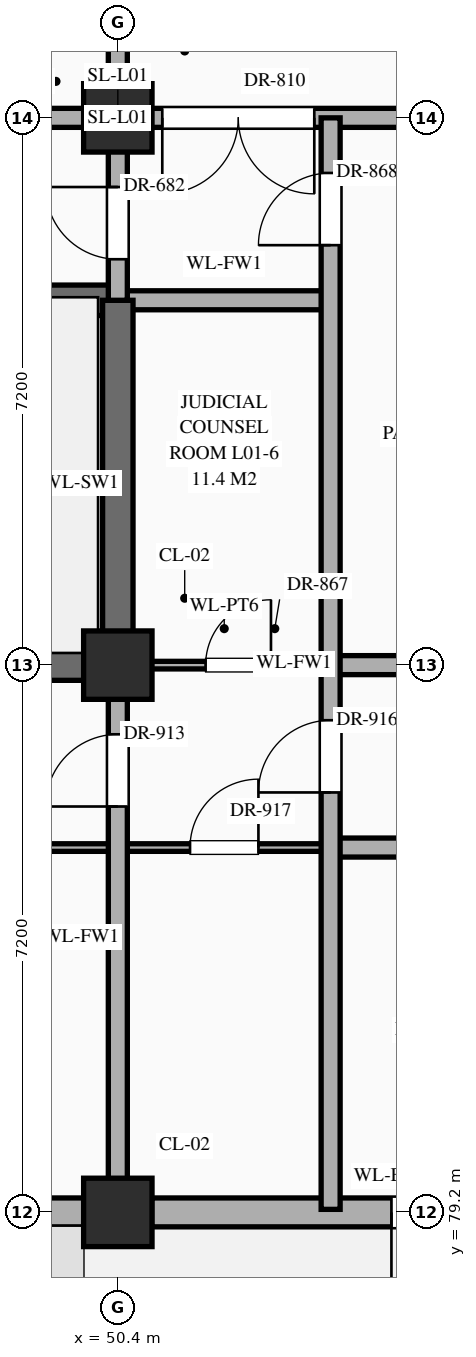
"""IFC4 building model, lengths in metres.
Left out: names, types, materials, properties, quantities, classifications, styles, units other than length and angle.
Written with IfcOpenShell. Run it as: python <this file> out.ifc"""

import sys

from ifc_helpers import new_model, si_unit, direction, frame, frame_2d, origin, origin_2d, place, context, subcontext, project, spatial, rectangle, extrude, element, fill, save


model = new_model("IFC4")
c1 = context("Model", 3, precision=1e-05, world=origin(), true_north=direction((0.0, 1.0)))
c2 = subcontext(c1, "Body", "Model", "MODEL_VIEW")
j1 = project(units=[si_unit("LENGTHUNIT", "METRE"), si_unit("PLANEANGLEUNIT", "RADIAN")], contexts=[c1])
p1 = place(None, origin())
s1 = spatial("IfcSite", under=j1, at=p1, CompositionType="ELEMENT")
p2 = place(p1, origin())
s2 = spatial("IfcBuilding", under=s1, at=p2, CompositionType="ELEMENT")
p3 = place(p2, origin())
s3 = spatial("IfcBuildingStorey", under=s2, at=p3, CompositionType="ELEMENT", Elevation=0.0)
for number, where, z_axis, x_axis in (
    (1, (50.4, 79.2, 0.0), (0.0, 0.0, 1.0), (1.0, 0.0, 0.0)),
    (2, (50.4, 86.4, 0.0), (0.0, 0.0, 1.0), (1.0, 0.0, 0.0)),
    (3, (50.4, 93.6, 0.0), (0.0, 0.0, 1.0), (1.0, 0.0, 0.0)),
):
    element("IfcColumn", number, at=place(p3, frame(where, z_axis=z_axis, x_axis=x_axis)), inside=s3, PredefinedType="COLUMN", context=c2, shape_type="SweptSolid", body=[
        extrude(rectangle(XDim=0.9, YDim=0.9, at=origin_2d()), origin(), (0.0, 0.0, 1.0), 5.4),
    ])
p4 = place(p3, frame((42.42, 79.2, 0.0), z_axis=(0.0, 0.0, 1.0), x_axis=(1.0, 0.0, 0.0)))
e4 = element("IfcWall", 4, at=p4, inside=s3, PredefinedType="STANDARD", context=c2, shape_type="SweptSolid", body=[
    extrude(rectangle(XDim=7.535, YDim=0.38, at=frame_2d((3.768, 0.0))), origin(), (0.0, 0.0, 1.0), 4.47),
])
p5 = place(p4, frame((2.567, 0.0, 0.0)))
e5 = element("IfcOpeningElement", 5, at=p5, cuts=e4, PredefinedType="OPENING", context=c2, shape_type="SweptSolid", body=[
    extrude(rectangle(XDim=2.4, YDim=2.4, at=frame_2d((1.2, 1.2))), frame((0.0, 0.202, 0.0), z_axis=(0.0, -1.0, 0.0), x_axis=(1.0, 0.0, 0.0)), (0.0, 0.0, 1.0), 0.404),
])
p6 = place(p3, frame((50.845, 79.2, 0.0), z_axis=(0.0, 0.0, 1.0), x_axis=(1.0, 0.0, 0.0)))
e6 = element("IfcWall", 6, at=p6, inside=s3, PredefinedType="STANDARD", context=c2, shape_type="SweptSolid", body=[
    extrude(rectangle(XDim=7.51, YDim=0.38, at=frame_2d((3.755, 0.0))), origin(), (0.0, 0.0, 1.0), 4.47),
])
p7 = place(p6, frame((3.155, 0.0, 0.0)))
e7 = element("IfcOpeningElement", 7, at=p7, cuts=e6, PredefinedType="OPENING", context=c2, shape_type="SweptSolid", body=[
    extrude(rectangle(XDim=1.2, YDim=2.2, at=frame_2d((0.6, 1.1))), frame((0.0, 0.202, 0.0), z_axis=(0.0, -1.0, 0.0), x_axis=(1.0, 0.0, 0.0)), (0.0, 0.0, 1.0), 0.404),
])
p8 = place(p3, frame((30.8, 84.0, 0.0), z_axis=(0.0, 0.0, 1.0), x_axis=(1.0, 0.0, 0.0)))
e8 = element("IfcWall", 8, at=p8, inside=s3, PredefinedType="STANDARD", context=c2, shape_type="SweptSolid", body=[
    extrude(rectangle(XDim=22.4, YDim=0.1, at=frame_2d((11.2, 0.0))), origin(), (0.0, 0.0, 1.0), 5.12),
])
p9 = place(p8, frame((0.89, 0.0, 0.0)))
e9 = element("IfcOpeningElement", 9, at=p9, cuts=e8, PredefinedType="OPENING", context=c2, shape_type="SweptSolid", body=[
    extrude(rectangle(XDim=1.02, YDim=2.4, at=frame_2d((0.51, 1.2))), frame((0.0, 0.062, 0.0), z_axis=(0.0, -1.0, 0.0), x_axis=(1.0, 0.0, 0.0)), (0.0, 0.0, 1.0), 0.124),
])
p10 = place(p8, frame((10.475, 0.0, 0.0)))
e10 = element("IfcOpeningElement", 10, at=p10, cuts=e8, PredefinedType="OPENING", context=c2, shape_type="SweptSolid", body=[
    extrude(rectangle(XDim=1.45, YDim=2.3, at=frame_2d((0.725, 1.15))), frame((0.0, 0.062, 0.0), z_axis=(0.0, -1.0, 0.0), x_axis=(1.0, 0.0, 0.0)), (0.0, 0.0, 1.0), 0.124),
])
p11 = place(p8, frame((20.55, 0.0, 0.0)))
e11 = element("IfcOpeningElement", 11, at=p11, cuts=e8, PredefinedType="OPENING", context=c2, shape_type="SweptSolid", body=[
    extrude(rectangle(XDim=0.9, YDim=2.15, at=frame_2d((0.45, 1.075))), frame((0.0, 0.062, 0.0), z_axis=(0.0, -1.0, 0.0), x_axis=(1.0, 0.0, 0.0)), (0.0, 0.0, 1.0), 0.124),
])
p12 = place(p3, frame((53.2, 84.0, 0.0), z_axis=(0.0, 0.0, 1.0), x_axis=(1.0, 0.0, 0.0)))
e12 = element("IfcWall", 12, at=p12, inside=s3, PredefinedType="STANDARD", context=c2, shape_type="SweptSolid", body=[
    extrude(rectangle(XDim=2.8, YDim=0.25, at=frame_2d((1.4, 0.0))), origin(), (0.0, 0.0, 1.0), 5.12),
])
p13 = place(p12, frame((0.925, 0.0, 0.0)))
e13 = element("IfcOpeningElement", 13, at=p13, cuts=e12, PredefinedType="OPENING", context=c2, shape_type="SweptSolid", body=[
    extrude(rectangle(XDim=0.95, YDim=2.15, at=frame_2d((0.475, 1.075))), frame((0.0, 0.137, 0.0), z_axis=(0.0, -1.0, 0.0), x_axis=(1.0, 0.0, 0.0)), (0.0, 0.0, 1.0), 0.274),
])
p14 = place(p3, frame((42.0, 86.4, 0.0), z_axis=(0.0, 0.0, 1.0), x_axis=(1.0, 0.0, 0.0)))
e14 = element("IfcWall", 14, at=p14, inside=s3, PredefinedType="SHEAR", context=c2, shape_type="SweptSolid", body=[
    extrude(rectangle(XDim=8.4, YDim=0.4, at=frame_2d((4.2, 0.0))), origin(), (0.0, 0.0, 1.0), 5.12),
])
p15 = place(p3, frame((50.4, 86.4, 0.0), z_axis=(0.0, 0.0, 1.0), x_axis=(1.0, 0.0, 0.0)))
e15 = element("IfcWall", 15, at=p15, inside=s3, PredefinedType="STANDARD", context=c2, shape_type="SweptSolid", body=[
    extrude(rectangle(XDim=2.8, YDim=0.1, at=frame_2d((1.4, 0.0))), origin(), (0.0, 0.0, 1.0), 4.27),
])
p16 = place(p15, frame((1.155, 0.0, 0.0)))
e16 = element("IfcOpeningElement", 16, at=p16, cuts=e15, PredefinedType="OPENING", context=c2, shape_type="SweptSolid", body=[
    extrude(rectangle(XDim=0.86, YDim=2.1, at=frame_2d((0.43, 1.05))), frame((0.0, 0.062, 0.0), z_axis=(0.0, -1.0, 0.0), x_axis=(1.0, 0.0, 0.0)), (0.0, 0.0, 1.0), 0.124),
])
p17 = place(p3, frame((53.2, 86.4, 0.0), z_axis=(0.0, 0.0, 1.0), x_axis=(1.0, 0.0, 0.0)))
e17 = element("IfcWall", 17, at=p17, inside=s3, PredefinedType="STANDARD", context=c2, shape_type="SweptSolid", body=[
    extrude(rectangle(XDim=2.8, YDim=0.25, at=frame_2d((1.4, 0.0))), origin(), (0.0, 0.0, 1.0), 4.27),
])
p18 = place(p17, frame((0.9, 0.0, 0.0)))
e18 = element("IfcOpeningElement", 18, at=p18, cuts=e17, PredefinedType="OPENING", context=c2, shape_type="SweptSolid", body=[
    extrude(rectangle(XDim=1.0, YDim=2.2, at=frame_2d((0.5, 1.1))), frame((0.0, 0.137, 0.0), z_axis=(0.0, -1.0, 0.0), x_axis=(1.0, 0.0, 0.0)), (0.0, 0.0, 1.0), 0.274),
])
p19 = place(p3, frame((42.0, 91.2, 0.0), z_axis=(0.0, 0.0, 1.0), x_axis=(1.0, 0.0, 0.0)))
e19 = element("IfcWall", 19, at=p19, inside=s3, PredefinedType="SHEAR", context=c2, shape_type="SweptSolid", body=[
    extrude(rectangle(XDim=8.4, YDim=0.4, at=frame_2d((4.2, 0.0))), origin(), (0.0, 0.0, 1.0), 5.12),
])
p20 = place(p19, frame((0.65, 0.0, 0.0)))
e20 = element("IfcOpeningElement", 20, at=p20, cuts=e19, PredefinedType="OPENING", context=c2, shape_type="SweptSolid", body=[
    extrude(rectangle(XDim=1.1, YDim=2.2, at=frame_2d((0.55, 1.1))), frame((0.0, 0.212, 0.0), z_axis=(0.0, -1.0, 0.0), x_axis=(1.0, 0.0, 0.0)), (0.0, 0.0, 1.0), 0.424),
])
p21 = place(p3, frame((50.4, 91.2, 0.0), z_axis=(0.0, 0.0, 1.0), x_axis=(1.0, 0.0, 0.0)))
e21 = element("IfcWall", 21, at=p21, inside=s3, PredefinedType="STANDARD", context=c2, shape_type="SweptSolid", body=[
    extrude(rectangle(XDim=2.8, YDim=0.25, at=frame_2d((1.4, 0.0))), origin(), (0.0, 0.0, 1.0), 5.12),
])
p22 = place(p3, frame((42.0, 93.6, 0.0), z_axis=(0.0, 0.0, 1.0), x_axis=(1.0, 0.0, 0.0)))
e22 = element("IfcWall", 22, at=p22, inside=s3, PredefinedType="STANDARD", context=c2, shape_type="SweptSolid", body=[
    extrude(rectangle(XDim=25.2, YDim=0.25, at=frame_2d((12.6, 0.0))), origin(), (0.0, 0.0, 1.0), 4.27),
])
p23 = place(p22, frame((20.2, 0.0, 0.0)))
e23 = element("IfcOpeningElement", 23, at=p23, cuts=e22, PredefinedType="OPENING", context=c2, shape_type="SweptSolid", body=[
    extrude(rectangle(XDim=1.6, YDim=2.3, at=frame_2d((0.8, 1.15))), frame((0.0, 0.137, 0.0), z_axis=(0.0, -1.0, 0.0), x_axis=(1.0, 0.0, 0.0)), (0.0, 0.0, 1.0), 0.274),
])
p24 = place(p22, frame((3.288, 0.0, 0.0)))
e24 = element("IfcOpeningElement", 24, at=p24, cuts=e22, PredefinedType="OPENING", context=c2, shape_type="SweptSolid", body=[
    extrude(rectangle(XDim=1.8, YDim=2.35, at=frame_2d((0.9, 1.175))), frame((0.0, 0.137, 0.0), z_axis=(0.0, -1.0, 0.0), x_axis=(1.0, 0.0, 0.0)), (0.0, 0.0, 1.0), 0.274),
])
p25 = place(p22, frame((8.985, 0.0, 0.0)))
e25 = element("IfcOpeningElement", 25, at=p25, cuts=e22, PredefinedType="OPENING", context=c2, shape_type="SweptSolid", body=[
    extrude(rectangle(XDim=2.0, YDim=2.4, at=frame_2d((1.0, 1.2))), frame((0.0, 0.137, 0.0), z_axis=(0.0, -1.0, 0.0), x_axis=(1.0, 0.0, 0.0)), (0.0, 0.0, 1.0), 0.274),
])
p26 = place(p22, frame((12.125, 0.0, 0.0)))
e26 = element("IfcOpeningElement", 26, at=p26, cuts=e22, PredefinedType="OPENING", context=c2, shape_type="SweptSolid", body=[
    extrude(rectangle(XDim=0.95, YDim=2.15, at=frame_2d((0.475, 1.075))), frame((0.0, 0.137, 0.0), z_axis=(0.0, -1.0, 0.0), x_axis=(1.0, 0.0, 0.0)), (0.0, 0.0, 1.0), 0.274),
])
p27 = place(p22, frame((14.665, 0.0, 0.0)))
e27 = element("IfcOpeningElement", 27, at=p27, cuts=e22, PredefinedType="OPENING", context=c2, shape_type="SweptSolid", body=[
    extrude(rectangle(XDim=1.1, YDim=2.2, at=frame_2d((0.55, 1.1))), frame((0.0, 0.137, 0.0), z_axis=(0.0, -1.0, 0.0), x_axis=(1.0, 0.0, 0.0)), (0.0, 0.0, 1.0), 0.274),
])
p28 = place(p3, frame((50.4, 79.24, 0.0), z_axis=(0.0, 0.0, 1.0), x_axis=(0.0, 1.0, 0.0)))
e28 = element("IfcWall", 28, at=p28, inside=s3, PredefinedType="STANDARD", context=c2, shape_type="SweptSolid", body=[
    extrude(rectangle(XDim=7.16, YDim=0.25, at=frame_2d((3.58, 0.0))), origin(), (0.0, 0.0, 1.0), 4.37),
])
p29 = place(p28, frame((5.3, 0.0, 0.0)))
e29 = element("IfcOpeningElement", 29, at=p29, cuts=e28, PredefinedType="OPENING", context=c2, shape_type="SweptSolid", body=[
    extrude(rectangle(XDim=0.95, YDim=2.15, at=frame_2d((0.475, 1.075))), frame((0.0, 0.137, 0.0), z_axis=(0.0, -1.0, 0.0), x_axis=(1.0, 0.0, 0.0)), (0.0, 0.0, 1.0), 0.274),
])
p30 = place(p3, frame((50.4, 86.4, 0.0), z_axis=(0.0, 0.0, 1.0), x_axis=(0.0, 1.0, 0.0)))
e30 = element("IfcWall", 30, at=p30, inside=s3, PredefinedType="SHEAR", context=c2, shape_type="SweptSolid", body=[
    extrude(rectangle(XDim=4.8, YDim=0.4, at=frame_2d((2.4, 0.0))), origin(), (0.0, 0.0, 1.0), 5.12),
])
p31 = place(p3, frame((50.4, 91.2, 0.0), z_axis=(0.0, 0.0, 1.0), x_axis=(0.0, 1.0, 0.0)))
e31 = element("IfcWall", 31, at=p31, inside=s3, PredefinedType="STANDARD", context=c2, shape_type="SweptSolid", body=[
    extrude(rectangle(XDim=13.2, YDim=0.25, at=frame_2d((6.6, 0.0))), origin(), (0.0, 0.0, 1.0), 4.37),
])
p32 = place(p31, frame((0.54, 0.0, 0.0)))
e32 = element("IfcOpeningElement", 32, at=p32, cuts=e31, PredefinedType="OPENING", context=c2, shape_type="SweptSolid", body=[
    extrude(rectangle(XDim=0.95, YDim=2.15, at=frame_2d((0.475, 1.075))), frame((0.0, 0.137, 0.0), z_axis=(0.0, -1.0, 0.0), x_axis=(1.0, 0.0, 0.0)), (0.0, 0.0, 1.0), 0.274),
])
p33 = place(p31, frame((10.485, 0.0, 0.0)))
e33 = element("IfcOpeningElement", 33, at=p33, cuts=e31, PredefinedType="OPENING", context=c2, shape_type="SweptSolid", body=[
    extrude(rectangle(XDim=1.0, YDim=2.2, at=frame_2d((0.5, 1.1))), frame((0.0, 0.137, 0.0), z_axis=(0.0, -1.0, 0.0), x_axis=(1.0, 0.0, 0.0)), (0.0, 0.0, 1.0), 0.274),
])
p34 = place(p31, frame((3.31, 0.0, 0.0)))
e34 = element("IfcOpeningElement", 34, at=p34, cuts=e31, PredefinedType="OPENING", context=c2, shape_type="SweptSolid", body=[
    extrude(rectangle(XDim=0.95, YDim=2.15, at=frame_2d((0.475, 1.075))), frame((0.0, 0.137, 0.0), z_axis=(0.0, -1.0, 0.0), x_axis=(1.0, 0.0, 0.0)), (0.0, 0.0, 1.0), 0.274),
])
p35 = place(p3, frame((53.2, 79.24, 0.0), z_axis=(0.0, 0.0, 1.0), x_axis=(0.0, 1.0, 0.0)))
e35 = element("IfcWall", 35, at=p35, inside=s3, PredefinedType="STANDARD", context=c2, shape_type="SweptSolid", body=[
    extrude(rectangle(XDim=14.36, YDim=0.25, at=frame_2d((7.18, 0.0))), origin(), (0.0, 0.0, 1.0), 5.12),
])
p36 = place(p35, frame((12.685, 0.0, 0.0)))
e36 = element("IfcOpeningElement", 36, at=p36, cuts=e35, PredefinedType="OPENING", context=c2, shape_type="SweptSolid", body=[
    extrude(rectangle(XDim=0.95, YDim=2.15, at=frame_2d((0.475, 1.075))), frame((0.0, 0.137, 0.0), z_axis=(0.0, -1.0, 0.0), x_axis=(1.0, 0.0, 0.0)), (0.0, 0.0, 1.0), 0.274),
])
p37 = place(p35, frame((5.485, 0.0, 0.0)))
e37 = element("IfcOpeningElement", 37, at=p37, cuts=e35, PredefinedType="OPENING", context=c2, shape_type="SweptSolid", body=[
    extrude(rectangle(XDim=0.95, YDim=2.15, at=frame_2d((0.475, 1.075))), frame((0.0, 0.137, 0.0), z_axis=(0.0, -1.0, 0.0), x_axis=(1.0, 0.0, 0.0)), (0.0, 0.0, 1.0), 0.274),
])
p38 = place(p7, frame((1.2, 0.0, 0.0), z_axis=(0.0, 0.0, 1.0), x_axis=(-1.0, 0.0, 0.0)))
e38 = element("IfcDoor", 38, at=p38, inside=s3, OperationType="SINGLE_SWING_RIGHT", PredefinedType="DOOR", context=c2, shape_type="SweptSolid", body=[
    extrude(rectangle(XDim=1.2, YDim=2.2, at=frame_2d((0.6, 1.1))), frame((0.0, 0.025, 0.0), z_axis=(0.0, -1.0, 0.0), x_axis=(1.0, 0.0, 0.0)), (0.0, 0.0, 1.0), 0.05),
])
fill(e7, e38)
p39 = place(p32, origin())
e39 = element("IfcDoor", 39, at=p39, inside=s3, OperationType="SINGLE_SWING_RIGHT", PredefinedType="DOOR", context=c2, shape_type="SweptSolid", body=[
    extrude(rectangle(XDim=0.95, YDim=2.15, at=frame_2d((0.475, 1.075))), frame((0.0, 0.025, 0.0), z_axis=(0.0, -1.0, 0.0), x_axis=(1.0, 0.0, 0.0)), (0.0, 0.0, 1.0), 0.05),
])
fill(e32, e39)
p40 = place(p25, frame((2.0, 0.0, 0.0), z_axis=(0.0, 0.0, 1.0), x_axis=(-1.0, 0.0, 0.0)))
e40 = element("IfcDoor", 40, at=p40, inside=s3, OperationType="DOUBLE_DOOR_SINGLE_SWING", PredefinedType="DOOR", context=c2, shape_type="SweptSolid", body=[
    extrude(rectangle(XDim=2.0, YDim=2.4, at=frame_2d((1.0, 1.2))), frame((0.0, 0.025, 0.0), z_axis=(0.0, -1.0, 0.0), x_axis=(1.0, 0.0, 0.0)), (0.0, 0.0, 1.0), 0.05),
])
fill(e25, e40)
p41 = place(p16, origin())
e41 = element("IfcDoor", 41, at=p41, inside=s3, OperationType="SINGLE_SWING_RIGHT", PredefinedType="DOOR", context=c2, shape_type="SweptSolid", body=[
    extrude(rectangle(XDim=0.86, YDim=2.1, at=frame_2d((0.43, 1.05))), frame((0.0, 0.025, 0.0), z_axis=(0.0, -1.0, 0.0), x_axis=(1.0, 0.0, 0.0)), (0.0, 0.0, 1.0), 0.05),
])
fill(e16, e41)
p42 = place(p36, origin())
e42 = element("IfcDoor", 42, at=p42, inside=s3, OperationType="SINGLE_SWING_LEFT", PredefinedType="DOOR", context=c2, shape_type="SweptSolid", body=[
    extrude(rectangle(XDim=0.95, YDim=2.15, at=frame_2d((0.475, 1.075))), frame((0.0, 0.025, 0.0), z_axis=(0.0, -1.0, 0.0), x_axis=(1.0, 0.0, 0.0)), (0.0, 0.0, 1.0), 0.05),
])
fill(e36, e42)
p43 = place(p29, origin())
e43 = element("IfcDoor", 43, at=p43, inside=s3, OperationType="SINGLE_SWING_LEFT", PredefinedType="DOOR", context=c2, shape_type="SweptSolid", body=[
    extrude(rectangle(XDim=0.95, YDim=2.15, at=frame_2d((0.475, 1.075))), frame((0.0, 0.025, 0.0), z_axis=(0.0, -1.0, 0.0), x_axis=(1.0, 0.0, 0.0)), (0.0, 0.0, 1.0), 0.05),
])
fill(e29, e43)
p44 = place(p37, origin())
e44 = element("IfcDoor", 44, at=p44, inside=s3, OperationType="SINGLE_SWING_LEFT", PredefinedType="DOOR", context=c2, shape_type="SweptSolid", body=[
    extrude(rectangle(XDim=0.95, YDim=2.15, at=frame_2d((0.475, 1.075))), frame((0.0, 0.025, 0.0), z_axis=(0.0, -1.0, 0.0), x_axis=(1.0, 0.0, 0.0)), (0.0, 0.0, 1.0), 0.05),
])
fill(e37, e44)
p45 = place(p11, origin())
e45 = element("IfcDoor", 45, at=p45, inside=s3, OperationType="SINGLE_SWING_RIGHT", PredefinedType="DOOR", context=c2, shape_type="SweptSolid", body=[
    extrude(rectangle(XDim=0.9, YDim=2.15, at=frame_2d((0.45, 1.075))), frame((0.0, 0.025, 0.0), z_axis=(0.0, -1.0, 0.0), x_axis=(1.0, 0.0, 0.0)), (0.0, 0.0, 1.0), 0.05),
])
fill(e11, e45)
save(model, sys.argv[1])
